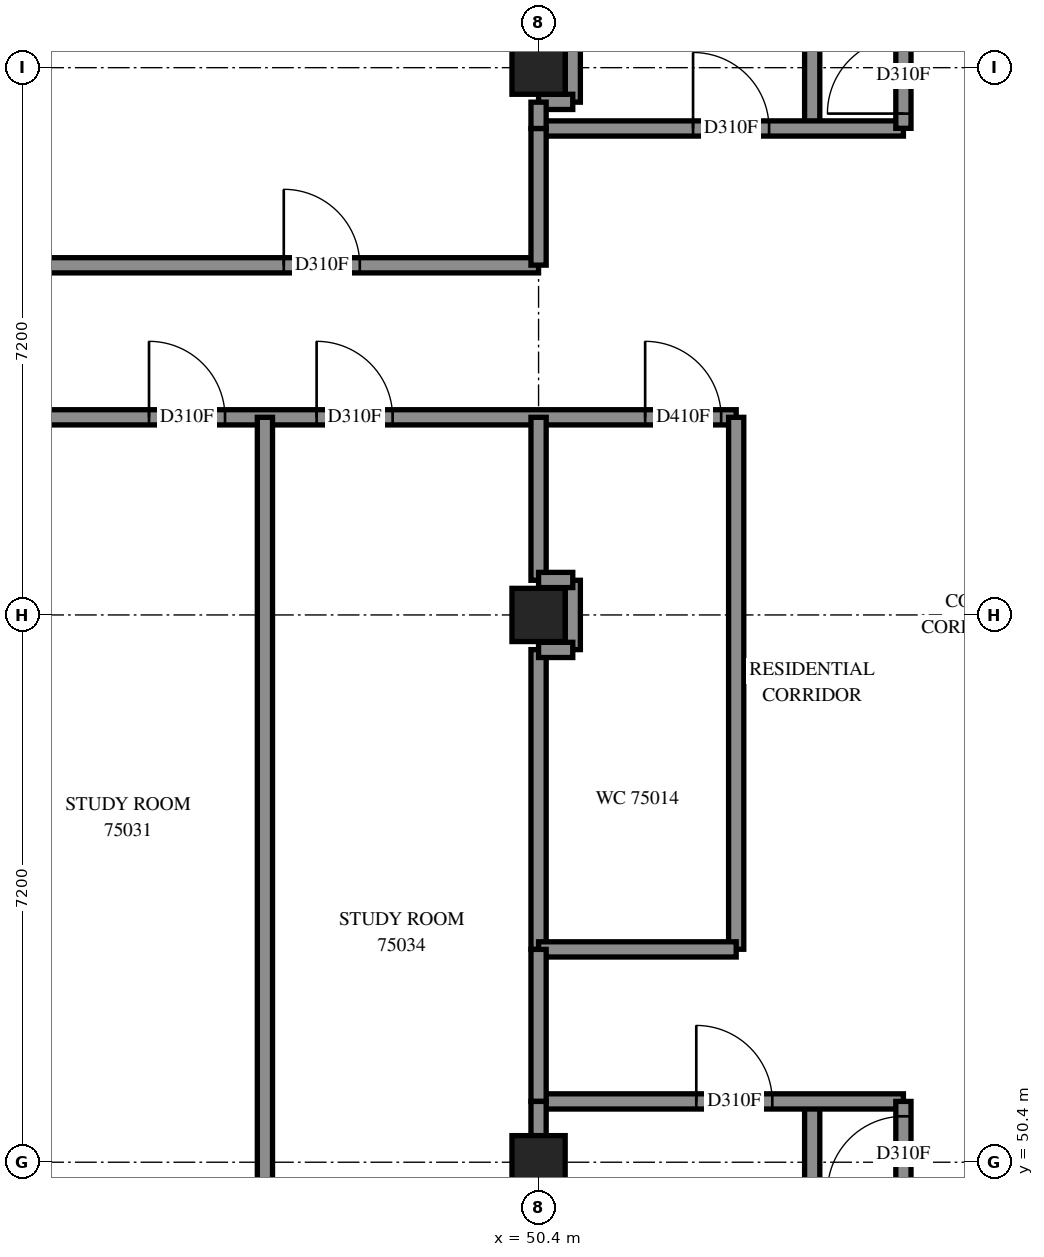
"""IFC4 building model, lengths in metres.
Left out: names, types, materials, properties, quantities, classifications, styles, units other than length and angle.
Written with IfcOpenShell. Run it as: python <this file> out.ifc"""

import sys

from ifc_helpers import new_model, si_unit, direction, frame, frame_2d, origin, origin_2d, place, context, subcontext, project, spatial, rectangle, extrude, element, fill, save


model = new_model("IFC4")
c1 = context("Model", 3, precision=1e-05, world=origin(), true_north=direction((0.0, 1.0)))
c2 = subcontext(c1, "Body", "Model", "MODEL_VIEW")
j1 = project(units=[si_unit("LENGTHUNIT", "METRE"), si_unit("PLANEANGLEUNIT", "RADIAN")], contexts=[c1])
p1 = place(None, origin())
s1 = spatial("IfcSite", under=j1, at=p1, CompositionType="ELEMENT")
p2 = place(p1, origin())
s2 = spatial("IfcBuilding", under=s1, at=p2, CompositionType="ELEMENT")
p3 = place(p2, frame((0.0, 0.0, 274.4)))
s3 = spatial("IfcBuildingStorey", under=s2, at=p3, CompositionType="ELEMENT", Elevation=274.4)
for number, where, z_axis, x_axis in (
    (1, (50.4, 50.4, 0.0), (0.0, 0.0, 1.0), (1.0, 0.0, 0.0)),
    (2, (50.4, 57.6, 0.0), (0.0, 0.0, 1.0), (1.0, 0.0, 0.0)),
    (3, (50.4, 64.8, 0.0), (0.0, 0.0, 1.0), (1.0, 0.0, 0.0)),
):
    element("IfcColumn", number, at=place(p3, frame(where, z_axis=z_axis, x_axis=x_axis)), inside=s3, PredefinedType="COLUMN", context=c2, shape_type="SweptSolid", body=[
        extrude(rectangle(XDim=0.7, YDim=0.7, at=origin_2d()), origin(), (0.0, 0.0, 1.0), 3.1),
    ])
p4 = place(p3, frame((36.0, 60.2, 0.0), z_axis=(0.0, 0.0, 1.0), x_axis=(1.0, 0.0, 0.0)))
e4 = element("IfcWall", 4, at=p4, inside=s3, PredefinedType="PARTITIONING", context=c2, shape_type="SweptSolid", body=[
    extrude(rectangle(XDim=17.0, YDim=0.2, at=frame_2d((8.5, 0.0))), origin(), (0.0, 0.0, 1.0), 3.1),
])
p5 = place(p4, frame((15.802, 0.0, 0.0)))
e5 = element("IfcOpeningElement", 5, at=p5, cuts=e4, PredefinedType="OPENING", context=c2, shape_type="SweptSolid", body=[
    extrude(rectangle(XDim=1.0, YDim=2.1, at=frame_2d((0.5, 1.05))), frame((0.0, 0.11, 0.0), z_axis=(0.0, -1.0, 0.0), x_axis=(1.0, 0.0, 0.0)), (0.0, 0.0, 1.0), 0.22),
])
p6 = place(p4, frame((2.075, 0.0, 0.0)))
e6 = element("IfcOpeningElement", 6, at=p6, cuts=e4, PredefinedType="OPENING", context=c2, shape_type="SweptSolid", body=[
    extrude(rectangle(XDim=1.0, YDim=2.1, at=frame_2d((0.5, 1.05))), frame((0.0, 0.11, 0.0), z_axis=(0.0, -1.0, 0.0), x_axis=(1.0, 0.0, 0.0)), (0.0, 0.0, 1.0), 0.22),
])
p7 = place(p4, frame((4.125, 0.0, 0.0)))
e7 = element("IfcOpeningElement", 7, at=p7, cuts=e4, PredefinedType="OPENING", context=c2, shape_type="SweptSolid", body=[
    extrude(rectangle(XDim=1.0, YDim=2.1, at=frame_2d((0.5, 1.05))), frame((0.0, 0.11, 0.0), z_axis=(0.0, -1.0, 0.0), x_axis=(1.0, 0.0, 0.0)), (0.0, 0.0, 1.0), 0.22),
])
p8 = place(p4, frame((9.275, 0.0, 0.0)))
e8 = element("IfcOpeningElement", 8, at=p8, cuts=e4, PredefinedType="OPENING", context=c2, shape_type="SweptSolid", body=[
    extrude(rectangle(XDim=1.0, YDim=2.1, at=frame_2d((0.5, 1.05))), frame((0.0, 0.11, 0.0), z_axis=(0.0, -1.0, 0.0), x_axis=(1.0, 0.0, 0.0)), (0.0, 0.0, 1.0), 0.22),
])
p9 = place(p4, frame((11.48, 0.0, 0.0)))
e9 = element("IfcOpeningElement", 9, at=p9, cuts=e4, PredefinedType="OPENING", context=c2, shape_type="SweptSolid", body=[
    extrude(rectangle(XDim=1.0, YDim=2.1, at=frame_2d((0.5, 1.05))), frame((0.0, 0.11, 0.0), z_axis=(0.0, -1.0, 0.0), x_axis=(1.0, 0.0, 0.0)), (0.0, 0.0, 1.0), 0.22),
])
p10 = place(p3, frame((46.8, 49.65, 0.0), z_axis=(0.0, 0.0, 1.0), x_axis=(0.0, 1.0, 0.0)))
e10 = element("IfcWall", 10, at=p10, inside=s3, PredefinedType="PARTITIONING", context=c2, shape_type="SweptSolid", body=[
    extrude(rectangle(XDim=10.55, YDim=0.2, at=frame_2d((5.275, 0.0))), origin(), (0.0, 0.0, 1.0), 3.1),
])
p11 = place(p3, frame((40.602, 62.2, 0.0), z_axis=(0.0, 0.0, 1.0), x_axis=(1.0, 0.0, 0.0)))
e11 = element("IfcWall", 11, at=p11, inside=s3, PredefinedType="PARTITIONING", context=c2, shape_type="SweptSolid", body=[
    extrude(rectangle(XDim=9.798, YDim=0.2, at=frame_2d((4.899, 0.0))), origin(), (0.0, 0.0, 1.0), 3.1),
])
p12 = place(p11, frame((6.446, 0.0, 0.0)))
e12 = element("IfcOpeningElement", 12, at=p12, cuts=e11, PredefinedType="OPENING", context=c2, shape_type="SweptSolid", body=[
    extrude(rectangle(XDim=1.0, YDim=2.1, at=frame_2d((0.5, 1.05))), frame((0.0, 0.11, 0.0), z_axis=(0.0, -1.0, 0.0), x_axis=(1.0, 0.0, 0.0)), (0.0, 0.0, 1.0), 0.22),
])
p13 = place(p3, frame((54.0, 42.268, 0.0), z_axis=(0.0, 0.0, 1.0), x_axis=(0.0, 1.0, 0.0)))
e13 = element("IfcWall", 13, at=p13, inside=s3, PredefinedType="PARTITIONING", context=c2, shape_type="SweptSolid", body=[
    extrude(rectangle(XDim=8.932, YDim=0.2, at=frame_2d((4.466, 0.0))), origin(), (0.0, 0.0, 1.0), 3.1),
])
p14 = place(p3, frame((54.0, 64.0, 0.0), z_axis=(0.0, 0.0, 1.0), x_axis=(0.0, 1.0, 0.0)))
e14 = element("IfcWall", 14, at=p14, inside=s3, PredefinedType="PARTITIONING", context=c2, shape_type="SweptSolid", body=[
    extrude(rectangle(XDim=8.848, YDim=0.2, at=frame_2d((4.424, 0.0))), origin(), (0.0, 0.0, 1.0), 3.1),
])
p15 = place(p3, frame((53.0, 53.202, 0.0), z_axis=(0.0, 0.0, 1.0), x_axis=(0.0, 1.0, 0.0)))
e15 = element("IfcWall", 15, at=p15, inside=s3, PredefinedType="PARTITIONING", context=c2, shape_type="SweptSolid", body=[
    extrude(rectangle(XDim=6.998, YDim=0.2, at=frame_2d((3.499, 0.0))), origin(), (0.0, 0.0, 1.0), 3.1),
])
p16 = place(p3, frame((50.4, 51.2, 0.0), z_axis=(0.0, 0.0, 1.0), x_axis=(1.0, 0.0, 0.0)))
e16 = element("IfcWall", 16, at=p16, inside=s3, PredefinedType="PARTITIONING", context=c2, shape_type="SweptSolid", body=[
    extrude(rectangle(XDim=4.8, YDim=0.2, at=frame_2d((2.4, 0.0))), origin(), (0.0, 0.0, 1.0), 3.1),
])
p17 = place(p16, frame((2.075, 0.0, 0.0)))
e17 = element("IfcOpeningElement", 17, at=p17, cuts=e16, PredefinedType="OPENING", context=c2, shape_type="SweptSolid", body=[
    extrude(rectangle(XDim=1.0, YDim=2.1, at=frame_2d((0.5, 1.05))), frame((0.0, 0.11, 0.0), z_axis=(0.0, -1.0, 0.0), x_axis=(1.0, 0.0, 0.0)), (0.0, 0.0, 1.0), 0.22),
])
p18 = place(p3, frame((50.4, 64.0, 0.0), z_axis=(0.0, 0.0, 1.0), x_axis=(1.0, 0.0, 0.0)))
e18 = element("IfcWall", 18, at=p18, inside=s3, PredefinedType="PARTITIONING", context=c2, shape_type="SweptSolid", body=[
    extrude(rectangle(XDim=4.8, YDim=0.2, at=frame_2d((2.4, 0.0))), origin(), (0.0, 0.0, 1.0), 3.1),
])
p19 = place(p18, frame((2.033, 0.0, 0.0)))
e19 = element("IfcOpeningElement", 19, at=p19, cuts=e18, PredefinedType="OPENING", context=c2, shape_type="SweptSolid", body=[
    extrude(rectangle(XDim=1.0, YDim=2.1, at=frame_2d((0.5, 1.05))), frame((0.0, 0.11, 0.0), z_axis=(0.0, -1.0, 0.0), x_axis=(1.0, 0.0, 0.0)), (0.0, 0.0, 1.0), 0.22),
])
p20 = place(p3, frame((50.4, 53.2, 0.0), z_axis=(0.0, 0.0, 1.0), x_axis=(0.0, 1.0, 0.0)))
e20 = element("IfcWall", 20, at=p20, inside=s3, PredefinedType="PARTITIONING", context=c2, shape_type="SweptSolid", body=[
    extrude(rectangle(XDim=3.944, YDim=0.2, at=frame_2d((1.972, 0.0))), origin(), (0.0, 0.0, 1.0), 3.1),
])
p21 = place(p3, frame((55.2, 48.0, 0.0), z_axis=(0.0, 0.0, 1.0), x_axis=(0.0, 1.0, 0.0)))
e21 = element("IfcWall", 21, at=p21, inside=s3, PredefinedType="PARTITIONING", context=c2, shape_type="SweptSolid", body=[
    extrude(rectangle(XDim=3.2, YDim=0.2, at=frame_2d((1.6, 0.0))), origin(), (0.0, 0.0, 1.0), 3.1),
])
p22 = place(p21, frame((2.004, 0.0, 0.0)))
e22 = element("IfcOpeningElement", 22, at=p22, cuts=e21, PredefinedType="OPENING", context=c2, shape_type="SweptSolid", body=[
    extrude(rectangle(XDim=1.0, YDim=2.1, at=frame_2d((0.5, 1.05))), frame((0.0, 0.11, 0.0), z_axis=(0.0, -1.0, 0.0), x_axis=(1.0, 0.0, 0.0)), (0.0, 0.0, 1.0), 0.22),
])
p23 = place(p3, frame((55.2, 64.002, 0.0), z_axis=(0.0, 0.0, 1.0), x_axis=(0.0, 1.0, 0.0)))
e23 = element("IfcWall", 23, at=p23, inside=s3, PredefinedType="PARTITIONING", context=c2, shape_type="SweptSolid", body=[
    extrude(rectangle(XDim=3.198, YDim=0.2, at=frame_2d((1.599, 0.0))), origin(), (0.0, 0.0, 1.0), 3.1),
])
p24 = place(p23, frame((0.194, 0.0, 0.0)))
e24 = element("IfcOpeningElement", 24, at=p24, cuts=e23, PredefinedType="OPENING", context=c2, shape_type="SweptSolid", body=[
    extrude(rectangle(XDim=1.0, YDim=2.1, at=frame_2d((0.5, 1.05))), frame((0.0, 0.11, 0.0), z_axis=(0.0, -1.0, 0.0), x_axis=(1.0, 0.0, 0.0)), (0.0, 0.0, 1.0), 0.22),
])
p25 = place(p3, frame((50.4, 53.2, 0.0), z_axis=(0.0, 0.0, 1.0), x_axis=(1.0, 0.0, 0.0)))
e25 = element("IfcWall", 25, at=p25, inside=s3, PredefinedType="PARTITIONING", context=c2, shape_type="SweptSolid", body=[
    extrude(rectangle(XDim=2.6, YDim=0.2, at=frame_2d((1.3, 0.0))), origin(), (0.0, 0.0, 1.0), 3.1),
])
p26 = place(p3, frame((50.4, 58.056, 0.0), z_axis=(0.0, 0.0, 1.0), x_axis=(0.0, 1.0, 0.0)))
e26 = element("IfcWall", 26, at=p26, inside=s3, PredefinedType="PARTITIONING", context=c2, shape_type="SweptSolid", body=[
    extrude(rectangle(XDim=2.144, YDim=0.2, at=frame_2d((1.072, 0.0))), origin(), (0.0, 0.0, 1.0), 3.1),
])
p27 = place(p3, frame((50.4, 51.2, 0.0), z_axis=(0.0, 0.0, 1.0), x_axis=(0.0, 1.0, 0.0)))
e27 = element("IfcWall", 27, at=p27, inside=s3, PredefinedType="PARTITIONING", context=c2, shape_type="SweptSolid", body=[
    extrude(rectangle(XDim=2.0, YDim=0.2, at=frame_2d((1.0, 0.0))), origin(), (0.0, 0.0, 1.0), 3.1),
])
p28 = place(p3, frame((50.4, 62.202, 0.0), z_axis=(0.0, 0.0, 1.0), x_axis=(0.0, 1.0, 0.0)))
e28 = element("IfcWall", 28, at=p28, inside=s3, PredefinedType="PARTITIONING", context=c2, shape_type="SweptSolid", body=[
    extrude(rectangle(XDim=1.798, YDim=0.2, at=frame_2d((0.899, 0.0))), origin(), (0.0, 0.0, 1.0), 3.1),
])
p29 = place(p3, frame((50.85, 57.144, 0.0), z_axis=(0.0, 0.0, 1.0), x_axis=(0.0, 1.0, 0.0)))
e29 = element("IfcWall", 29, at=p29, inside=s3, PredefinedType="PARTITIONING", context=c2, shape_type="SweptSolid", body=[
    extrude(rectangle(XDim=0.912, YDim=0.2, at=frame_2d((0.456, 0.0))), origin(), (0.0, 0.0, 1.0), 3.1),
])
p30 = place(p3, frame((50.85, 64.346, 0.0), z_axis=(0.0, 0.0, 1.0), x_axis=(0.0, 1.0, 0.0)))
e30 = element("IfcWall", 30, at=p30, inside=s3, PredefinedType="PARTITIONING", context=c2, shape_type="SweptSolid", body=[
    extrude(rectangle(XDim=0.908, YDim=0.2, at=frame_2d((0.454, 0.0))), origin(), (0.0, 0.0, 1.0), 3.1),
])
for number, where, z_axis, x_axis in (
    (31, (50.4, 64.35, 0.0), (0.0, 0.0, 1.0), (1.0, 0.0, 0.0)),
    (32, (50.4, 50.75, 0.0), (0.0, 0.0, 1.0), (0.0, 1.0, 0.0)),
    (33, (50.4, 57.14, 0.0), (0.0, 0.0, 1.0), (1.0, 0.0, 0.0)),
    (34, (50.4, 58.06, 0.0), (0.0, 0.0, 1.0), (1.0, 0.0, 0.0)),
):
    element("IfcWall", number, at=place(p3, frame(where, z_axis=z_axis, x_axis=x_axis)), inside=s3, PredefinedType="PARTITIONING", context=c2, shape_type="SweptSolid", body=[
        extrude(rectangle(XDim=0.45, YDim=0.2, at=frame_2d((0.225, 0.0))), origin(), (0.0, 0.0, 1.0), 3.1),
    ])
p31 = place(p3, frame((50.4, 64.0, 0.0), z_axis=(0.0, 0.0, 1.0), x_axis=(0.0, 1.0, 0.0)))
e35 = element("IfcWall", 35, at=p31, inside=s3, PredefinedType="PARTITIONING", context=c2, shape_type="SweptSolid", body=[
    extrude(rectangle(XDim=0.346, YDim=0.2, at=frame_2d((0.173, 0.0))), origin(), (0.0, 0.0, 1.0), 3.1),
])
p32 = place(p5, origin())
e36 = element("IfcDoor", 36, at=p32, inside=s3, OperationType="SINGLE_SWING_LEFT", PredefinedType="DOOR", context=c2, shape_type="SweptSolid", body=[
    extrude(rectangle(XDim=1.0, YDim=2.1, at=frame_2d((0.5, 1.05))), frame((0.0, 0.025, 0.0), z_axis=(0.0, -1.0, 0.0), x_axis=(1.0, 0.0, 0.0)), (0.0, 0.0, 1.0), 0.05),
])
fill(e5, e36)
p33 = place(p19, origin())
e37 = element("IfcDoor", 37, at=p33, inside=s3, OperationType="SINGLE_SWING_RIGHT", PredefinedType="DOOR", context=c2, shape_type="SweptSolid", body=[
    extrude(rectangle(XDim=1.0, YDim=2.1, at=frame_2d((0.5, 1.05))), frame((0.0, 0.025, 0.0), z_axis=(0.0, -1.0, 0.0), x_axis=(1.0, 0.0, 0.0)), (0.0, 0.0, 1.0), 0.05),
])
fill(e19, e37)
p34 = place(p24, origin())
e38 = element("IfcDoor", 38, at=p34, inside=s3, OperationType="SINGLE_SWING_LEFT", PredefinedType="DOOR", context=c2, shape_type="SweptSolid", body=[
    extrude(rectangle(XDim=1.0, YDim=2.1, at=frame_2d((0.5, 1.05))), frame((0.0, 0.025, 0.0), z_axis=(0.0, -1.0, 0.0), x_axis=(1.0, 0.0, 0.0)), (0.0, 0.0, 1.0), 0.05),
])
fill(e24, e38)
p35 = place(p8, origin())
e39 = element("IfcDoor", 39, at=p35, inside=s3, OperationType="SINGLE_SWING_LEFT", PredefinedType="DOOR", context=c2, shape_type="SweptSolid", body=[
    extrude(rectangle(XDim=1.0, YDim=2.1, at=frame_2d((0.5, 1.05))), frame((0.0, 0.025, 0.0), z_axis=(0.0, -1.0, 0.0), x_axis=(1.0, 0.0, 0.0)), (0.0, 0.0, 1.0), 0.05),
])
fill(e8, e39)
p36 = place(p12, origin())
e40 = element("IfcDoor", 40, at=p36, inside=s3, OperationType="SINGLE_SWING_RIGHT", PredefinedType="DOOR", context=c2, shape_type="SweptSolid", body=[
    extrude(rectangle(XDim=1.0, YDim=2.1, at=frame_2d((0.5, 1.05))), frame((0.0, 0.025, 0.0), z_axis=(0.0, -1.0, 0.0), x_axis=(1.0, 0.0, 0.0)), (0.0, 0.0, 1.0), 0.05),
])
fill(e12, e40)
p37 = place(p9, origin())
e41 = element("IfcDoor", 41, at=p37, inside=s3, OperationType="SINGLE_SWING_RIGHT", PredefinedType="DOOR", context=c2, shape_type="SweptSolid", body=[
    extrude(rectangle(XDim=1.0, YDim=2.1, at=frame_2d((0.5, 1.05))), frame((0.0, 0.025, 0.0), z_axis=(0.0, -1.0, 0.0), x_axis=(1.0, 0.0, 0.0)), (0.0, 0.0, 1.0), 0.05),
])
fill(e9, e41)
p38 = place(p17, origin())
e42 = element("IfcDoor", 42, at=p38, inside=s3, OperationType="SINGLE_SWING_LEFT", PredefinedType="DOOR", context=c2, shape_type="SweptSolid", body=[
    extrude(rectangle(XDim=1.0, YDim=2.1, at=frame_2d((0.5, 1.05))), frame((0.0, 0.025, 0.0), z_axis=(0.0, -1.0, 0.0), x_axis=(1.0, 0.0, 0.0)), (0.0, 0.0, 1.0), 0.05),
])
fill(e17, e42)
p39 = place(p22, origin())
e43 = element("IfcDoor", 43, at=p39, inside=s3, OperationType="SINGLE_SWING_RIGHT", PredefinedType="DOOR", context=c2, shape_type="SweptSolid", body=[
    extrude(rectangle(XDim=1.0, YDim=2.1, at=frame_2d((0.5, 1.05))), frame((0.0, 0.025, 0.0), z_axis=(0.0, -1.0, 0.0), x_axis=(1.0, 0.0, 0.0)), (0.0, 0.0, 1.0), 0.05),
])
fill(e22, e43)
save(model, sys.argv[1])
